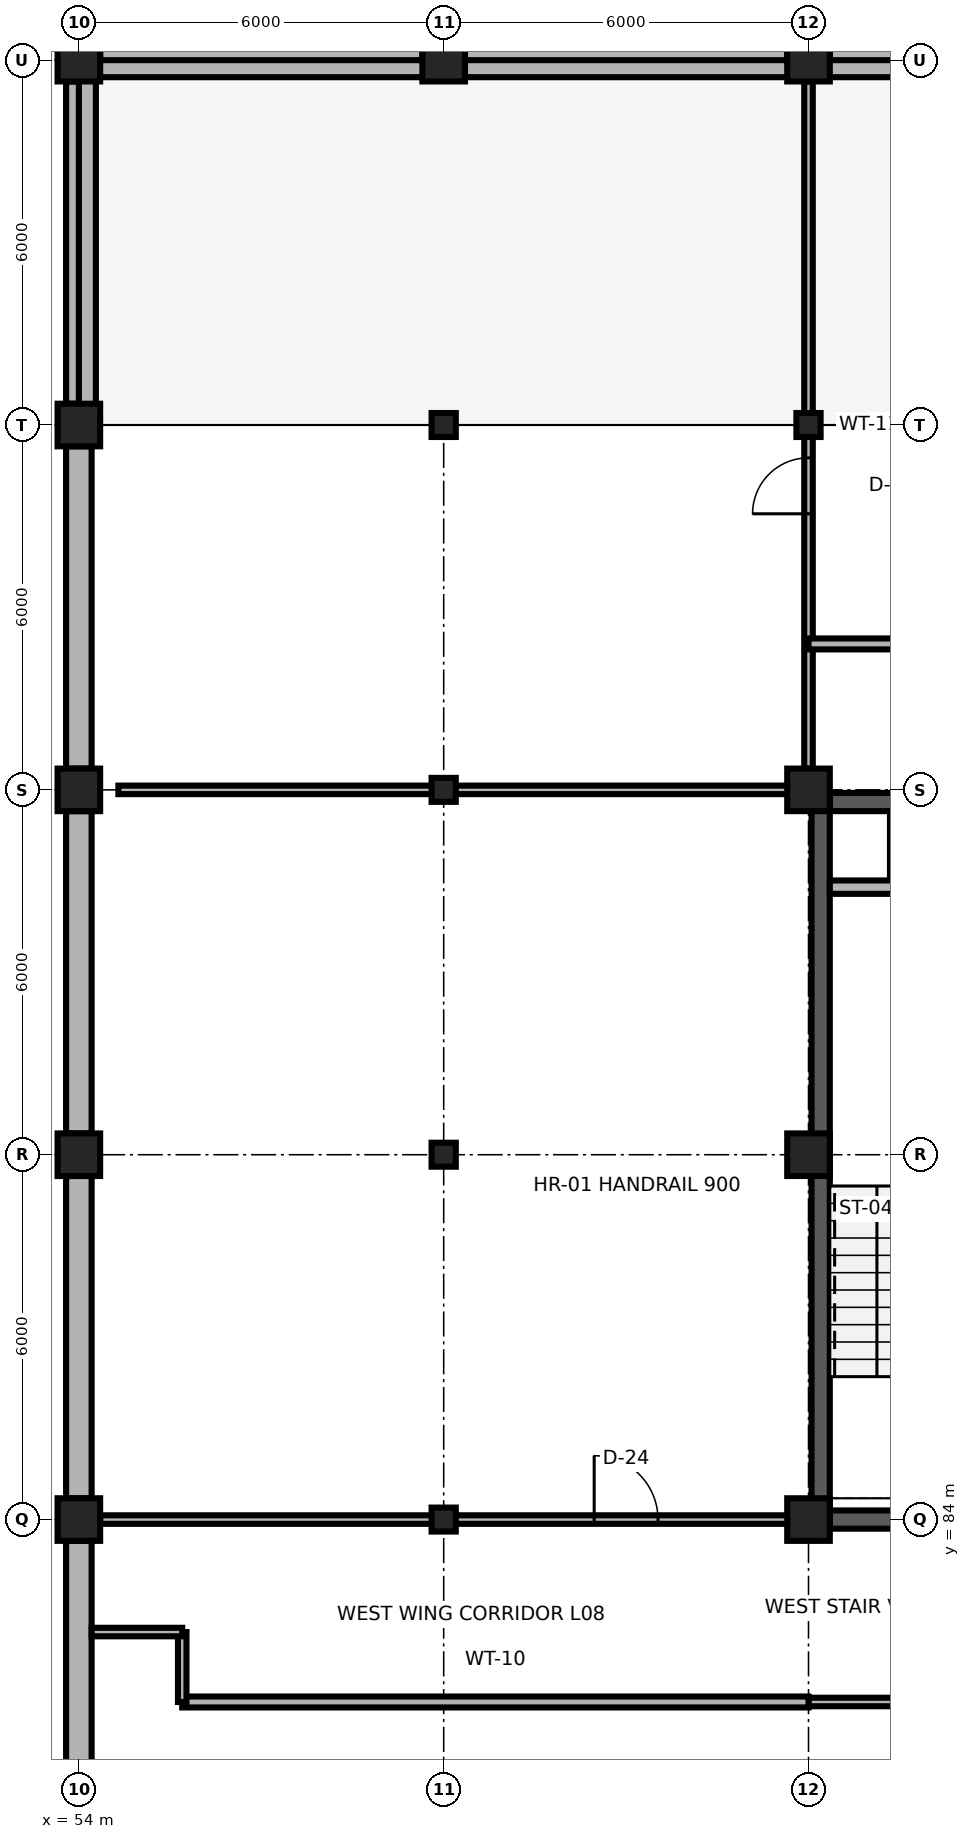
"""IFC4 building model, lengths in metres.
Left out: names, types, materials, properties, quantities, classifications, styles, units other than length and angle.
Written with IfcOpenShell. Run it as: python <this file> out.ifc"""

import sys

from ifc_helpers import new_model, si_unit, direction, frame, frame_2d, origin, origin_2d, place, context, subcontext, project, spatial, rectangle, i_section, extrude, element, fill, save


model = new_model("IFC4")
c1 = context("Model", 3, precision=1e-05, world=origin(), true_north=direction((0.0, 1.0)))
c2 = subcontext(c1, "Body", "Model", "MODEL_VIEW")
j1 = project(units=[si_unit("LENGTHUNIT", "METRE"), si_unit("PLANEANGLEUNIT", "RADIAN")], contexts=[c1])
p1 = place(None, origin())
s1 = spatial("IfcSite", under=j1, at=p1, CompositionType="ELEMENT")
p2 = place(p1, origin())
s2 = spatial("IfcBuilding", under=s1, at=p2, CompositionType="ELEMENT")
p3 = place(p2, frame((0.0, 0.0, 32.7)))
s3 = spatial("IfcBuildingStorey", under=s2, at=p3, CompositionType="ELEMENT", Elevation=32.7)
p4 = place(p3, frame((54.0, 84.0, 0.0), z_axis=(0.0, 0.0, 1.0), x_axis=(1.0, 0.0, 0.0)))
e1 = element("IfcColumn", 1, at=p4, inside=s3, PredefinedType="COLUMN", context=c2, shape_type="SweptSolid", body=[
    extrude(rectangle(XDim=0.7, YDim=0.7, at=origin_2d()), origin(), (0.0, 0.0, 1.0), 3.68),
])
p5 = place(p3, frame((60.0, 84.0, 0.0), z_axis=(0.0, 0.0, 1.0), x_axis=(1.0, 0.0, 0.0)))
e2 = element("IfcColumn", 2, at=p5, inside=s3, PredefinedType="COLUMN", context=c2, shape_type="SweptSolid", body=[
    extrude(i_section(OverallWidth=0.398, OverallDepth=0.394, WebThickness=0.011, FlangeThickness=0.018, FilletRadius=0.022, at=origin_2d()), origin(), (0.0, 0.0, 1.0), 3.9),
])
p6 = place(p3, frame((66.0, 84.0, 0.0), z_axis=(0.0, 0.0, 1.0), x_axis=(1.0, 0.0, 0.0)))
e3 = element("IfcColumn", 3, at=p6, inside=s3, PredefinedType="COLUMN", context=c2, shape_type="SweptSolid", body=[
    extrude(rectangle(XDim=0.7, YDim=0.7, at=origin_2d()), origin(), (0.0, 0.0, 1.0), 3.9),
])
p7 = place(p3, frame((54.0, 90.0, 0.0), z_axis=(0.0, 0.0, 1.0), x_axis=(1.0, 0.0, 0.0)))
e4 = element("IfcColumn", 4, at=p7, inside=s3, PredefinedType="COLUMN", context=c2, shape_type="SweptSolid", body=[
    extrude(rectangle(XDim=0.7, YDim=0.7, at=origin_2d()), origin(), (0.0, 0.0, 1.0), 3.68),
])
p8 = place(p3, frame((60.0, 90.0, 0.0), z_axis=(0.0, 0.0, 1.0), x_axis=(1.0, 0.0, 0.0)))
e5 = element("IfcColumn", 5, at=p8, inside=s3, PredefinedType="COLUMN", context=c2, shape_type="SweptSolid", body=[
    extrude(i_section(OverallWidth=0.398, OverallDepth=0.394, WebThickness=0.011, FlangeThickness=0.018, FilletRadius=0.022, at=origin_2d()), origin(), (0.0, 0.0, 1.0), 3.9),
])
p9 = place(p3, frame((66.0, 90.0, 0.0), z_axis=(0.0, 0.0, 1.0), x_axis=(1.0, 0.0, 0.0)))
e6 = element("IfcColumn", 6, at=p9, inside=s3, PredefinedType="COLUMN", context=c2, shape_type="SweptSolid", body=[
    extrude(rectangle(XDim=0.7, YDim=0.7, at=origin_2d()), origin(), (0.0, 0.0, 1.0), 3.9),
])
p10 = place(p3, frame((54.0, 96.0, 0.0), z_axis=(0.0, 0.0, 1.0), x_axis=(1.0, 0.0, 0.0)))
e7 = element("IfcColumn", 7, at=p10, inside=s3, PredefinedType="COLUMN", context=c2, shape_type="SweptSolid", body=[
    extrude(rectangle(XDim=0.7, YDim=0.7, at=origin_2d()), origin(), (0.0, 0.0, 1.0), 3.68),
])
p11 = place(p3, frame((60.0, 96.0, 0.0), z_axis=(0.0, 0.0, 1.0), x_axis=(1.0, 0.0, 0.0)))
e8 = element("IfcColumn", 8, at=p11, inside=s3, PredefinedType="COLUMN", context=c2, shape_type="SweptSolid", body=[
    extrude(i_section(OverallWidth=0.398, OverallDepth=0.394, WebThickness=0.011, FlangeThickness=0.018, FilletRadius=0.022, at=origin_2d()), origin(), (0.0, 0.0, 1.0), 3.9),
])
p12 = place(p3, frame((66.0, 96.0, 0.0), z_axis=(0.0, 0.0, 1.0), x_axis=(1.0, 0.0, 0.0)))
e9 = element("IfcColumn", 9, at=p12, inside=s3, PredefinedType="COLUMN", context=c2, shape_type="SweptSolid", body=[
    extrude(rectangle(XDim=0.7, YDim=0.7, at=origin_2d()), origin(), (0.0, 0.0, 1.0), 3.9),
])
p13 = place(p3, frame((54.0, 102.0, 0.0), z_axis=(0.0, 0.0, 1.0), x_axis=(1.0, 0.0, 0.0)))
e10 = element("IfcColumn", 10, at=p13, inside=s3, PredefinedType="COLUMN", context=c2, shape_type="SweptSolid", body=[
    extrude(rectangle(XDim=0.7, YDim=0.7, at=origin_2d()), origin(), (0.0, 0.0, 1.0), 3.68),
])
for number, where, z_axis, x_axis in (
    (11, (60.0, 102.0, 0.0), (0.0, 0.0, 1.0), (1.0, 0.0, 0.0)),
    (12, (66.0, 102.0, 0.0), (0.0, 0.0, 1.0), (1.0, 0.0, 0.0)),
):
    element("IfcColumn", number, at=place(p3, frame(where, z_axis=z_axis, x_axis=x_axis)), inside=s3, PredefinedType="COLUMN", context=c2, shape_type="SweptSolid", body=[
        extrude(i_section(OverallWidth=0.398, OverallDepth=0.394, WebThickness=0.011, FlangeThickness=0.018, FilletRadius=0.022, at=origin_2d()), origin(), (0.0, 0.0, 1.0), 3.9),
    ])
for number, where, z_axis, x_axis in (
    (13, (54.0, 108.0, 0.0), (0.0, 0.0, 1.0), (1.0, 0.0, 0.0)),
    (14, (60.0, 108.0, 0.0), (0.0, 0.0, 1.0), (1.0, 0.0, 0.0)),
    (15, (66.0, 108.0, 0.0), (0.0, 0.0, 1.0), (1.0, 0.0, 0.0)),
):
    element("IfcColumn", number, at=place(p3, frame(where, z_axis=z_axis, x_axis=x_axis)), inside=s3, PredefinedType="COLUMN", context=c2, shape_type="SweptSolid", body=[
        extrude(rectangle(XDim=0.7, YDim=0.7, at=origin_2d()), origin(), (0.0, 0.0, 1.0), 3.4),
    ])
for number, where, z_axis, x_axis in (
    (16, (54.35, 108.0, 0.0), (0.0, 0.0, 1.0), (1.0, 0.0, 0.0)),
    (17, (60.35, 108.0, 0.0), (0.0, 0.0, 1.0), (1.0, 0.0, 0.0)),
    (18, (66.35, 108.0, 0.0), (0.0, 0.0, 1.0), (1.0, 0.0, 0.0)),
    (19, (54.0, 78.35, 0.0), (0.0, 0.0, 1.0), (0.0, 1.0, 0.0)),
    (20, (54.0, 84.35, 0.0), (0.0, 0.0, 1.0), (0.0, 1.0, 0.0)),
    (21, (54.0, 90.35, 0.0), (0.0, 0.0, 1.0), (0.0, 1.0, 0.0)),
    (22, (54.0, 96.35, 0.0), (0.0, 0.0, 1.0), (0.0, 1.0, 0.0)),
    (23, (54.0, 102.35, 0.0), (0.0, 0.0, 1.0), (0.0, 1.0, 0.0)),
):
    element("IfcWall", number, at=place(p3, frame(where, z_axis=z_axis, x_axis=x_axis)), inside=s3, PredefinedType="SOLIDWALL", context=c2, shape_type="SweptSolid", body=[
        extrude(rectangle(XDim=5.3, YDim=0.42, at=frame_2d((2.65, 0.0))), origin(), (0.0, 0.0, 1.0), 2.98),
    ])
p14 = place(p3, frame((54.0, 107.86, 3.6), z_axis=(0.0, 0.0, 1.0), x_axis=(1.0, 0.0, 0.0)))
e24 = element("IfcWall", 24, at=p14, inside=s3, PredefinedType="PARAPET", context=c2, shape_type="SweptSolid", body=[
    extrude(rectangle(XDim=60.0, YDim=0.28, at=frame_2d((30.0, 0.0))), origin(), (0.0, 0.0, 1.0), 0.85),
])
p15 = place(p3, frame((54.14, 102.0, 3.6), z_axis=(0.0, 0.0, 1.0), x_axis=(0.0, 1.0, 0.0)))
e25 = element("IfcWall", 25, at=p15, inside=s3, PredefinedType="PARAPET", context=c2, shape_type="SweptSolid", body=[
    extrude(rectangle(XDim=6.0, YDim=0.28, at=frame_2d((3.0, 0.0))), origin(), (0.0, 0.0, 1.0), 0.85),
])
p16 = place(p3, frame((66.35, 84.0, 0.0), z_axis=(0.0, 0.0, 1.0), x_axis=(1.0, 0.0, 0.0)))
e26 = element("IfcWall", 26, at=p16, inside=s3, PredefinedType="SHEAR", context=c2, shape_type="SweptSolid", body=[
    extrude(rectangle(XDim=5.3, YDim=0.3, at=frame_2d((2.65, 0.0))), origin(), (0.0, 0.0, 1.0), 3.66),
])
p17 = place(p16, frame((1.975, 0.0, 0.0)))
e27 = element("IfcOpeningElement", 27, at=p17, cuts=e26, PredefinedType="OPENING", context=c2, shape_type="SweptSolid", body=[
    extrude(rectangle(XDim=1.35, YDim=2.2, at=frame_2d((0.675, 1.1))), frame((0.0, 0.165, 0.0), z_axis=(0.0, -1.0, 0.0), x_axis=(1.0, 0.0, 0.0)), (0.0, 0.0, 1.0), 0.33),
])
p18 = place(p3, frame((66.35, 95.8, 0.0), z_axis=(0.0, 0.0, 1.0), x_axis=(1.0, 0.0, 0.0)))
e28 = element("IfcWall", 28, at=p18, inside=s3, PredefinedType="SHEAR", context=c2, shape_type="SweptSolid", body=[
    extrude(rectangle(XDim=5.3, YDim=0.3, at=frame_2d((2.65, 0.0))), origin(), (0.0, 0.0, 1.0), 3.74),
])
p19 = place(p3, frame((66.2, 84.0, 0.0), z_axis=(0.0, 0.0, 1.0), x_axis=(0.0, 1.0, 0.0)))
e29 = element("IfcWall", 29, at=p19, inside=s3, PredefinedType="SHEAR", context=c2, shape_type="SweptSolid", body=[
    extrude(rectangle(XDim=11.8, YDim=0.3, at=frame_2d((5.9, 0.0))), origin(), (0.0, 0.0, 1.0), 3.74),
])
p20 = place(p3, frame((67.45, 94.4, 0.0), z_axis=(0.0, 0.0, 1.0), x_axis=(0.0, 1.0, 0.0)))
e30 = element("IfcWall", 30, at=p20, inside=s3, PredefinedType="PARTITIONING", context=c2, shape_type="SweptSolid", body=[
    extrude(rectangle(XDim=1.25, YDim=0.22, at=frame_2d((0.625, 0.0))), origin(), (0.0, 0.0, 1.0), 3.74),
])
p21 = place(p3, frame((66.35, 94.4, 0.0), z_axis=(0.0, 0.0, 1.0), x_axis=(1.0, 0.0, 0.0)))
e31 = element("IfcWall", 31, at=p21, inside=s3, PredefinedType="PARTITIONING", context=c2, shape_type="SweptSolid", body=[
    extrude(rectangle(XDim=1.1, YDim=0.22, at=frame_2d((0.55, 0.0))), origin(), (0.0, 0.0, 1.0), 3.74),
])
p22 = place(p3, frame((66.0, 96.35, 0.0), z_axis=(0.0, 0.0, 1.0), x_axis=(0.0, 1.0, 0.0)))
e32 = element("IfcWall", 32, at=p22, inside=s3, PredefinedType="PARTITIONING", context=c2, shape_type="SweptSolid", body=[
    extrude(rectangle(XDim=11.3, YDim=0.14, at=frame_2d((5.65, 0.0))), origin(), (0.0, 0.0, 1.0), 3.012),
])
p23 = place(p22, frame((4.19, 0.0, 0.0)))
e33 = element("IfcOpeningElement", 33, at=p23, cuts=e32, PredefinedType="OPENING", context=c2, shape_type="SweptSolid", body=[
    extrude(rectangle(XDim=0.92, YDim=2.15, at=frame_2d((0.46, 1.075))), frame((0.0, 0.085, 0.0), z_axis=(0.0, -1.0, 0.0), x_axis=(1.0, 0.0, 0.0)), (0.0, 0.0, 1.0), 0.17),
])
p24 = place(p3, frame((66.0, 81.0, 0.0), z_axis=(0.0, 0.0, 1.0), x_axis=(1.0, 0.0, 0.0)))
e34 = element("IfcWall", 34, at=p24, inside=s3, PredefinedType="PARTITIONING", context=c2, shape_type="SweptSolid", body=[
    extrude(rectangle(XDim=6.0, YDim=0.14, at=frame_2d((3.0, 0.0))), origin(), (0.0, 0.0, 1.0), 3.4),
])
p25 = place(p24, frame((2.175, 0.0, 0.0)))
e35 = element("IfcOpeningElement", 35, at=p25, cuts=e34, PredefinedType="OPENING", context=c2, shape_type="SweptSolid", body=[
    extrude(rectangle(XDim=1.65, YDim=2.35, at=frame_2d((0.825, 1.175))), frame((0.0, 0.085, 0.0), z_axis=(0.0, -1.0, 0.0), x_axis=(1.0, 0.0, 0.0)), (0.0, 0.0, 1.0), 0.17),
])
p26 = place(p3, frame((60.0, 84.0, 0.0), z_axis=(0.0, 0.0, 1.0), x_axis=(1.0, 0.0, 0.0)))
e36 = element("IfcWall", 36, at=p26, inside=s3, PredefinedType="PARTITIONING", context=c2, shape_type="SweptSolid", body=[
    extrude(rectangle(XDim=6.0, YDim=0.14, at=frame_2d((3.0, 0.0))), origin(), (0.0, 0.0, 1.0), 3.012),
])
p27 = place(p26, frame((2.475, 0.0, 0.0)))
e37 = element("IfcOpeningElement", 37, at=p27, cuts=e36, PredefinedType="OPENING", context=c2, shape_type="SweptSolid", body=[
    extrude(rectangle(XDim=1.05, YDim=2.25, at=frame_2d((0.525, 1.125))), frame((0.0, 0.085, 0.0), z_axis=(0.0, -1.0, 0.0), x_axis=(1.0, 0.0, 0.0)), (0.0, 0.0, 1.0), 0.17),
])
p28 = place(p3, frame((54.65, 96.0, 0.0), z_axis=(0.0, 0.0, 1.0), x_axis=(1.0, 0.0, 0.0)))
e38 = element("IfcWall", 38, at=p28, inside=s3, PredefinedType="PARTITIONING", context=c2, shape_type="SweptSolid", body=[
    extrude(rectangle(XDim=11.15, YDim=0.14, at=frame_2d((5.575, 0.0))), origin(), (0.0, 0.0, 1.0), 3.012),
])
p29 = place(p3, frame((55.7, 81.0, 0.0), z_axis=(0.0, 0.0, 1.0), x_axis=(1.0, 0.0, 0.0)))
e39 = element("IfcWall", 39, at=p29, inside=s3, PredefinedType="PARTITIONING", context=c2, shape_type="SweptSolid", body=[
    extrude(rectangle(XDim=10.3, YDim=0.18, at=frame_2d((5.15, 0.0))), origin(), (0.0, 0.0, 1.0), 3.4),
])
p30 = place(p3, frame((55.7, 81.0, 0.0), z_axis=(0.0, 0.0, 1.0), x_axis=(0.0, 1.0, 0.0)))
e40 = element("IfcWall", 40, at=p30, inside=s3, PredefinedType="PARTITIONING", context=c2, shape_type="SweptSolid", body=[
    extrude(rectangle(XDim=1.15, YDim=0.14, at=frame_2d((0.575, 0.0))), origin(), (0.0, 0.0, 1.0), 3.4),
])
p31 = place(p3, frame((55.7, 82.15, 0.0), z_axis=(0.0, 0.0, 1.0), x_axis=(-1.0, 0.0, 0.0)))
e41 = element("IfcWall", 41, at=p31, inside=s3, PredefinedType="PARTITIONING", context=c2, shape_type="SweptSolid", body=[
    extrude(rectangle(XDim=1.49, YDim=0.14, at=frame_2d((0.745, 0.0))), origin(), (0.0, 0.0, 1.0), 3.4),
])
p32 = place(p3, frame((66.0, 98.4, 0.0), z_axis=(0.0, 0.0, 1.0), x_axis=(1.0, 0.0, 0.0)))
e42 = element("IfcWall", 42, at=p32, inside=s3, PredefinedType="PARTITIONING", context=c2, shape_type="SweptSolid", body=[
    extrude(rectangle(XDim=12.0, YDim=0.18, at=frame_2d((6.0, 0.0))), origin(), (0.0, 0.0, 1.0), 3.4),
])
p33 = place(p3, frame((54.35, 84.0, 0.0), z_axis=(0.0, 0.0, 1.0), x_axis=(1.0, 0.0, 0.0)))
e43 = element("IfcWall", 43, at=p33, inside=s3, PredefinedType="PARTITIONING", context=c2, shape_type="SweptSolid", body=[
    extrude(rectangle(XDim=5.65, YDim=0.14, at=frame_2d((2.825, 0.0))), origin(), (0.0, 0.0, 1.0), 3.012),
])
p34 = place(p23, origin())
e44 = element("IfcDoor", 44, at=p34, inside=s3, OperationType="SINGLE_SWING_LEFT", PredefinedType="DOOR", context=c2, shape_type="SweptSolid", body=[
    extrude(rectangle(XDim=0.92, YDim=2.15, at=frame_2d((0.46, 1.075))), frame((0.0, 0.025, 0.0), z_axis=(0.0, -1.0, 0.0), x_axis=(1.0, 0.0, 0.0)), (0.0, 0.0, 1.0), 0.05),
])
fill(e33, e44)
p35 = place(p27, origin())
e45 = element("IfcDoor", 45, at=p35, inside=s3, OperationType="SINGLE_SWING_LEFT", PredefinedType="DOOR", context=c2, shape_type="SweptSolid", body=[
    extrude(rectangle(XDim=1.05, YDim=2.25, at=frame_2d((0.525, 1.125))), frame((0.0, 0.025, 0.0), z_axis=(0.0, -1.0, 0.0), x_axis=(1.0, 0.0, 0.0)), (0.0, 0.0, 1.0), 0.05),
])
fill(e37, e45)
save(model, sys.argv[1])
